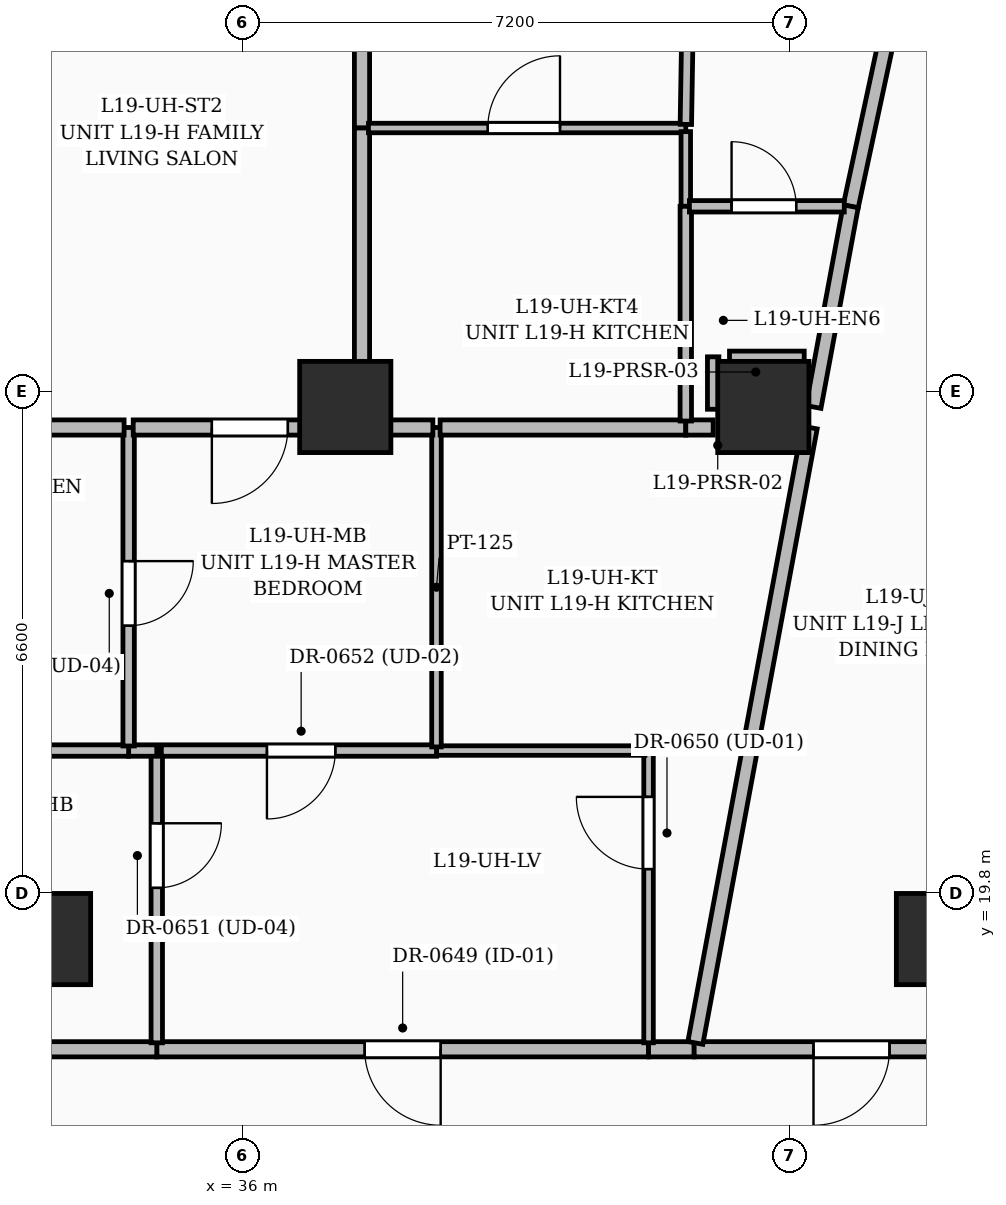
"""IFC4 building model, lengths in metres.
Left out: names, types, materials, properties, quantities, classifications, styles, units other than length and angle.
Written with IfcOpenShell. Run it as: python <this file> out.ifc"""

import sys

from ifc_helpers import new_model, si_unit, direction, frame, frame_2d, origin, origin_2d, place, context, subcontext, project, spatial, rectangle, extrude, element, fill, save


model = new_model("IFC4")
c1 = context("Model", 3, precision=1e-05, world=origin(), true_north=direction((0.0, 1.0)))
c2 = subcontext(c1, "Body", "Model", "MODEL_VIEW")
j1 = project(units=[si_unit("LENGTHUNIT", "METRE"), si_unit("PLANEANGLEUNIT", "RADIAN")], contexts=[c1])
p1 = place(None, origin())
s1 = spatial("IfcSite", under=j1, at=p1, CompositionType="ELEMENT")
p2 = place(p1, origin())
s2 = spatial("IfcBuilding", under=s1, at=p2, CompositionType="ELEMENT")
p3 = place(p2, frame((0.0, 0.0, 78.6)))
s3 = spatial("IfcBuildingStorey", under=s2, at=p3, CompositionType="ELEMENT", Elevation=78.6)
for number, where, z_axis, x_axis in (
    (1, (45.2, 19.2, 0.0), (0.0, 0.0, 1.0), (1.0, 0.0, 0.0)),
    (2, (42.85, 26.2, 0.0), (0.0, 0.0, 1.0), (1.0, 0.0, 0.0)),
    (3, (37.35, 26.2, 0.0), (0.0, 0.0, 1.0), (1.0, 0.0, 0.0)),
    (4, (33.4, 19.2, 0.0), (0.0, 0.0, 1.0), (1.0, 0.0, 0.0)),
):
    element("IfcColumn", number, at=place(p3, frame(where, z_axis=z_axis, x_axis=x_axis)), inside=s3, PredefinedType="COLUMN", context=c2, shape_type="SweptSolid", body=[
        extrude(rectangle(XDim=1.2, YDim=1.2, at=origin_2d()), origin(), (0.0, 0.0, 1.0), 3.6),
    ])
p4 = place(p3, frame((45.111, 34.154, 0.0), z_axis=(0.0, 0.0, 1.0), x_axis=(0.523710369238, -0.851896384047, 0.0)))
e5 = element("IfcWall", 5, at=p4, inside=s3, PredefinedType="SOLIDWALL", context=c2, shape_type="SweptSolid", body=[
    extrude(rectangle(XDim=5.596, YDim=0.3, at=frame_2d((2.798, 0.0))), origin(), (0.0, 0.0, 1.0), 3.35),
])
p5 = place(p4, frame((1.85, 0.0, 0.55)))
e6 = element("IfcOpeningElement", 6, at=p5, cuts=e5, PredefinedType="OPENING", context=c2, shape_type="SweptSolid", body=[
    extrude(rectangle(XDim=2.1, YDim=2.4, at=frame_2d((1.05, 1.2))), frame((0.0, 0.16, 0.0), z_axis=(0.0, -1.0, 0.0), x_axis=(1.0, 0.0, 0.0)), (0.0, 0.0, 1.0), 0.32),
])
p6 = place(p3, frame((41.34, 17.75, 0.0), z_axis=(0.0, 0.0, 1.0), x_axis=(-1.0, 0.0, 0.0)))
e7 = element("IfcWall", 7, at=p6, inside=s3, PredefinedType="PARTITIONING", context=c2, shape_type="SweptSolid", body=[
    extrude(rectangle(XDim=6.47, YDim=0.2, at=frame_2d((3.235, 0.0))), origin(), (0.0, 0.0, 1.0), 3.35),
])
p7 = place(p6, frame((2.735, 0.0, 0.0)))
e8 = element("IfcOpeningElement", 8, at=p7, cuts=e7, PredefinedType="OPENING", context=c2, shape_type="SweptSolid", body=[
    extrude(rectangle(XDim=1.0, YDim=2.2, at=frame_2d((0.5, 1.1))), frame((0.0, 0.11, 0.0), z_axis=(0.0, -1.0, 0.0), x_axis=(1.0, 0.0, 0.0)), (0.0, 0.0, 1.0), 0.22),
])
p8 = place(p3, frame((34.87, 17.75, 0.0), z_axis=(0.0, 0.0, 1.0), x_axis=(-1.0, 0.0, 0.0)))
e9 = element("IfcWall", 9, at=p8, inside=s3, PredefinedType="PARTITIONING", context=c2, shape_type="SweptSolid", body=[
    extrude(rectangle(XDim=2.57, YDim=0.2, at=frame_2d((1.285, 0.0))), origin(), (0.0, 0.0, 1.0), 2.309),
])
p9 = place(p3, frame((41.94, 17.75, 0.0), z_axis=(0.0, 0.0, 1.0), x_axis=(-1.0, 0.0, 0.0)))
e10 = element("IfcWall", 10, at=p9, inside=s3, PredefinedType="PARTITIONING", context=c2, shape_type="SweptSolid", body=[
    extrude(rectangle(XDim=0.6, YDim=0.2, at=frame_2d((0.3, 0.0))), origin(), (0.0, 0.0, 1.0), 3.35),
])
p10 = place(p3, frame((47.51, 17.75, 0.0), z_axis=(0.0, 0.0, 1.0), x_axis=(-1.0, 0.0, 0.0)))
e11 = element("IfcWall", 11, at=p10, inside=s3, PredefinedType="PARTITIONING", context=c2, shape_type="SweptSolid", body=[
    extrude(rectangle(XDim=5.57, YDim=0.2, at=frame_2d((2.785, 0.0))), origin(), (0.0, 0.0, 1.0), 2.309),
])
p11 = place(p10, frame((3.0, 0.0, 0.0)))
e12 = element("IfcOpeningElement", 12, at=p11, cuts=e11, PredefinedType="OPENING", context=c2, shape_type="SweptSolid", body=[
    extrude(rectangle(XDim=1.0, YDim=2.2, at=frame_2d((0.5, 1.1))), frame((0.0, 0.11, 0.0), z_axis=(0.0, -1.0, 0.0), x_axis=(1.0, 0.0, 0.0)), (0.0, 0.0, 1.0), 0.22),
])
p12 = place(p3, frame((34.87, 21.68, 0.0), z_axis=(0.0, 0.0, 1.0), x_axis=(0.0, -1.0, 0.0)))
e13 = element("IfcWall", 13, at=p12, inside=s3, PredefinedType="PARTITIONING", context=c2, shape_type="SweptSolid", body=[
    extrude(rectangle(XDim=3.845, YDim=0.15, at=frame_2d((1.922, 0.0))), origin(), (0.0, 0.0, 1.0), 2.309),
])
p13 = place(p12, frame((0.957, 0.0, 0.0)))
e14 = element("IfcOpeningElement", 14, at=p13, cuts=e13, PredefinedType="OPENING", context=c2, shape_type="SweptSolid", body=[
    extrude(rectangle(XDim=0.85, YDim=2.1, at=frame_2d((0.425, 1.05))), frame((0.0, 0.085, 0.0), z_axis=(0.0, -1.0, 0.0), x_axis=(1.0, 0.0, 0.0)), (0.0, 0.0, 1.0), 0.17),
])
p14 = place(p3, frame((41.34, 17.835, 0.0), z_axis=(0.0, 0.0, 1.0), x_axis=(0.0, 1.0, 0.0)))
e15 = element("IfcWall", 15, at=p14, inside=s3, PredefinedType="PARTITIONING", context=c2, shape_type="SweptSolid", body=[
    extrude(rectangle(XDim=3.845, YDim=0.125, at=frame_2d((1.922, 0.0))), origin(), (0.0, 0.0, 1.0), 3.35),
])
p15 = place(p14, frame((2.285, 0.0, 0.0)))
e16 = element("IfcOpeningElement", 16, at=p15, cuts=e15, PredefinedType="OPENING", context=c2, shape_type="SweptSolid", body=[
    extrude(rectangle(XDim=0.95, YDim=2.2, at=frame_2d((0.475, 1.1))), frame((0.0, 0.072, 0.0), z_axis=(0.0, -1.0, 0.0), x_axis=(1.0, 0.0, 0.0)), (0.0, 0.0, 1.0), 0.145),
])
p16 = place(p3, frame((41.292, 21.68, 0.0), z_axis=(0.0, 0.0, 1.0), x_axis=(-1.0, 0.0, 0.0)))
e17 = element("IfcWall", 17, at=p16, inside=s3, PredefinedType="PARTITIONING", context=c2, shape_type="SweptSolid", body=[
    extrude(rectangle(XDim=2.742, YDim=0.125, at=frame_2d((1.371, 0.0))), origin(), (0.0, 0.0, 1.0), 3.35),
])
p17 = place(p3, frame((38.55, 21.68, 0.0), z_axis=(0.0, 0.0, 1.0), x_axis=(-1.0, 0.0, 0.0)))
e18 = element("IfcWall", 18, at=p17, inside=s3, PredefinedType="PARTITIONING", context=c2, shape_type="SweptSolid", body=[
    extrude(rectangle(XDim=3.62, YDim=0.15, at=frame_2d((1.81, 0.0))), origin(), (0.0, 0.0, 1.0), 2.309),
])
p18 = place(p17, frame((1.331, 0.0, 0.0)))
e19 = element("IfcOpeningElement", 19, at=p18, cuts=e18, PredefinedType="OPENING", context=c2, shape_type="SweptSolid", body=[
    extrude(rectangle(XDim=0.9, YDim=2.15, at=frame_2d((0.45, 1.075))), frame((0.0, 0.085, 0.0), z_axis=(0.0, -1.0, 0.0), x_axis=(1.0, 0.0, 0.0)), (0.0, 0.0, 1.0), 0.17),
])
p19 = place(p3, frame((34.87, 21.68, 0.0), z_axis=(0.0, 0.0, 1.0), x_axis=(-1.0, 0.0, 0.0)))
e20 = element("IfcWall", 20, at=p19, inside=s3, PredefinedType="PARTITIONING", context=c2, shape_type="SweptSolid", body=[
    extrude(rectangle(XDim=0.37, YDim=0.15, at=frame_2d((0.185, 0.0))), origin(), (0.0, 0.0, 1.0), 2.309),
])
p20 = place(p3, frame((34.5, 21.68, 0.0), z_axis=(0.0, 0.0, 1.0), x_axis=(-1.0, 0.0, 0.0)))
e21 = element("IfcWall", 21, at=p20, inside=s3, PredefinedType="PARTITIONING", context=c2, shape_type="SweptSolid", body=[
    extrude(rectangle(XDim=2.115, YDim=0.15, at=frame_2d((1.058, 0.0))), origin(), (0.0, 0.0, 1.0), 3.35),
])
p21 = place(p3, frame((38.55, 25.93, 0.0), z_axis=(0.0, 0.0, 1.0), x_axis=(0.0, -1.0, 0.0)))
e22 = element("IfcWall", 22, at=p21, inside=s3, PredefinedType="PARTITIONING", context=c2, shape_type="SweptSolid", body=[
    extrude(rectangle(XDim=4.202, YDim=0.125, at=frame_2d((2.101, 0.0))), origin(), (0.0, 0.0, 1.0), 3.35),
])
p22 = place(p3, frame((41.956, 17.833, 0.0), z_axis=(0.0, 0.0, 1.0), x_axis=(0.182682671213, 0.98317192883, 0.0)))
e23 = element("IfcWall", 23, at=p22, inside=s3, PredefinedType="PARTITIONING", context=c2, shape_type="SweptSolid", body=[
    extrude(rectangle(XDim=8.235, YDim=0.2, at=frame_2d((4.118, 0.0))), origin(), (0.0, 0.0, 1.0), 2.309),
])
p23 = place(p3, frame((41.83, 25.93, 0.0), z_axis=(0.0, 0.0, 1.0), x_axis=(-1.0, 0.0, 0.0)))
e24 = element("IfcWall", 24, at=p23, inside=s3, PredefinedType="PARTITIONING", context=c2, shape_type="SweptSolid", body=[
    extrude(rectangle(XDim=3.233, YDim=0.2, at=frame_2d((1.616, 0.0))), origin(), (0.0, 0.0, 1.0), 2.309),
])
p24 = place(p3, frame((42.19, 25.93, 0.0), z_axis=(0.0, 0.0, 1.0), x_axis=(-1.0, 0.0, 0.0)))
e25 = element("IfcWall", 25, at=p24, inside=s3, PredefinedType="PARTITIONING", context=c2, shape_type="SweptSolid", body=[
    extrude(rectangle(XDim=0.36, YDim=0.2, at=frame_2d((0.18, 0.0))), origin(), (0.0, 0.0, 1.0), 2.309),
])
p25 = place(p3, frame((34.5, 25.93, 0.0), z_axis=(0.0, 0.0, 1.0), x_axis=(0.0, -1.0, 0.0)))
e26 = element("IfcWall", 26, at=p25, inside=s3, PredefinedType="PARTITIONING", context=c2, shape_type="SweptSolid", body=[
    extrude(rectangle(XDim=4.19, YDim=0.15, at=frame_2d((2.095, 0.0))), origin(), (0.0, 0.0, 1.0), 3.35),
])
p26 = place(p25, frame((1.758, 0.0, 0.0)))
e27 = element("IfcOpeningElement", 27, at=p26, cuts=e26, PredefinedType="OPENING", context=c2, shape_type="SweptSolid", body=[
    extrude(rectangle(XDim=0.85, YDim=2.1, at=frame_2d((0.425, 1.05))), frame((0.0, 0.085, 0.0), z_axis=(0.0, -1.0, 0.0), x_axis=(1.0, 0.0, 0.0)), (0.0, 0.0, 1.0), 0.17),
])
p27 = place(p3, frame((37.57, 25.93, 0.0), z_axis=(0.0, 0.0, 1.0), x_axis=(-1.0, 0.0, 0.0)))
e28 = element("IfcWall", 28, at=p27, inside=s3, PredefinedType="PARTITIONING", context=c2, shape_type="SweptSolid", body=[
    extrude(rectangle(XDim=3.01, YDim=0.2, at=frame_2d((1.505, 0.0))), origin(), (0.0, 0.0, 1.0), 3.35),
])
p28 = place(p27, frame((0.975, 0.0, 0.0)))
e29 = element("IfcOpeningElement", 29, at=p28, cuts=e28, PredefinedType="OPENING", context=c2, shape_type="SweptSolid", body=[
    extrude(rectangle(XDim=1.0, YDim=2.2, at=frame_2d((0.5, 1.1))), frame((0.0, 0.11, 0.0), z_axis=(0.0, -1.0, 0.0), x_axis=(1.0, 0.0, 0.0)), (0.0, 0.0, 1.0), 0.22),
])
p29 = place(p3, frame((38.502, 25.93, 0.0), z_axis=(0.0, 0.0, 1.0), x_axis=(-1.0, 0.0, 0.0)))
e30 = element("IfcWall", 30, at=p29, inside=s3, PredefinedType="PARTITIONING", context=c2, shape_type="SweptSolid", body=[
    extrude(rectangle(XDim=0.932, YDim=0.2, at=frame_2d((0.466, 0.0))), origin(), (0.0, 0.0, 1.0), 2.309),
])
p30 = place(p3, frame((34.44, 25.93, 0.0), z_axis=(0.0, 0.0, 1.0), x_axis=(-1.0, 0.0, 0.0)))
e31 = element("IfcWall", 31, at=p30, inside=s3, PredefinedType="PARTITIONING", context=c2, shape_type="SweptSolid", body=[
    extrude(rectangle(XDim=2.055, YDim=0.2, at=frame_2d((1.027, 0.0))), origin(), (0.0, 0.0, 1.0), 3.01),
])
p31 = place(p3, frame((45.093, 33.932, 0.0), z_axis=(0.0, 0.0, 1.0), x_axis=(-0.209881245986, -0.977726885476, 0.0)))
e32 = element("IfcWall", 32, at=p31, inside=s3, PredefinedType="PARTITIONING", context=c2, shape_type="SweptSolid", body=[
    extrude(rectangle(XDim=5.208, YDim=0.2, at=frame_2d((2.604, 0.0))), origin(), (0.0, 0.0, 1.0), 2.37),
])
p32 = place(p3, frame((44.0, 28.84, 0.0), z_axis=(0.0, 0.0, 1.0), x_axis=(-0.18247668152, -0.983210181345, 0.0)))
e33 = element("IfcWall", 33, at=p32, inside=s3, PredefinedType="PARTITIONING", context=c2, shape_type="SweptSolid", body=[
    extrude(rectangle(XDim=2.685, YDim=0.2, at=frame_2d((1.343, 0.0))), origin(), (0.0, 0.0, 1.0), 3.01),
])
p33 = place(p3, frame((37.57, 29.87, 0.0), z_axis=(0.0, 0.0, 1.0), x_axis=(0.0, 1.0, 0.0)))
e34 = element("IfcWall", 34, at=p33, inside=s3, PredefinedType="PARTITIONING", context=c2, shape_type="SweptSolid", body=[
    extrude(rectangle(XDim=6.99, YDim=0.2, at=frame_2d((3.495, 0.0))), origin(), (0.0, 0.0, 1.0), 2.37),
])
p34 = place(p33, frame((2.966, 0.0, 0.0)))
e35 = element("IfcOpeningElement", 35, at=p34, cuts=e34, PredefinedType="OPENING", context=c2, shape_type="SweptSolid", body=[
    extrude(rectangle(XDim=1.0, YDim=2.2, at=frame_2d((0.5, 1.1))), frame((0.0, 0.11, 0.0), z_axis=(0.0, -1.0, 0.0), x_axis=(1.0, 0.0, 0.0)), (0.0, 0.0, 1.0), 0.22),
])
p35 = place(p3, frame((37.57, 26.015, 0.0), z_axis=(0.0, 0.0, 1.0), x_axis=(0.0, 1.0, 0.0)))
e36 = element("IfcWall", 36, at=p35, inside=s3, PredefinedType="PARTITIONING", context=c2, shape_type="SweptSolid", body=[
    extrude(rectangle(XDim=3.855, YDim=0.2, at=frame_2d((1.928, 0.0))), origin(), (0.0, 0.0, 1.0), 3.01),
])
p36 = place(p3, frame((37.655, 29.87, 0.0), z_axis=(0.0, 0.0, 1.0), x_axis=(1.0, 0.0, 0.0)))
e37 = element("IfcWall", 37, at=p36, inside=s3, PredefinedType="PARTITIONING", context=c2, shape_type="SweptSolid", body=[
    extrude(rectangle(XDim=4.175, YDim=0.125, at=frame_2d((2.087, 0.0))), origin(), (0.0, 0.0, 1.0), 3.35),
])
p37 = place(p36, frame((1.57, 0.0, 0.0)))
e38 = element("IfcOpeningElement", 38, at=p37, cuts=e37, PredefinedType="OPENING", context=c2, shape_type="SweptSolid", body=[
    extrude(rectangle(XDim=0.95, YDim=2.2, at=frame_2d((0.475, 1.1))), frame((0.0, 0.072, 0.0), z_axis=(0.0, -1.0, 0.0), x_axis=(1.0, 0.0, 0.0)), (0.0, 0.0, 1.0), 0.145),
])
p38 = place(p3, frame((41.831, 29.917, 0.0), z_axis=(0.0, 0.0, 1.0), x_axis=(0.016599696118, 0.999862215552, 0.0)))
e39 = element("IfcWall", 39, at=p38, inside=s3, PredefinedType="PARTITIONING", context=c2, shape_type="SweptSolid", body=[
    extrude(rectangle(XDim=9.06, YDim=0.15, at=frame_2d((4.53, 0.0))), origin(), (0.0, 0.0, 1.0), 2.345),
])
p39 = place(p38, frame((4.152, 0.0, 0.0)))
e40 = element("IfcOpeningElement", 40, at=p39, cuts=e39, PredefinedType="OPENING", context=c2, shape_type="SweptSolid", body=[
    extrude(rectangle(XDim=0.9, YDim=2.15, at=frame_2d((0.45, 1.075))), frame((0.0, 0.085, 0.0), z_axis=(0.0, -1.0, 0.0), x_axis=(1.0, 0.0, 0.0)), (0.0, 0.0, 1.0), 0.17),
])
p40 = place(p3, frame((41.83, 28.84, 0.0), z_axis=(0.0, 0.0, 1.0), x_axis=(0.0, 1.0, 0.0)))
e41 = element("IfcWall", 41, at=p40, inside=s3, PredefinedType="PARTITIONING", context=c2, shape_type="SweptSolid", body=[
    extrude(rectangle(XDim=0.982, YDim=0.125, at=frame_2d((0.491, 0.0))), origin(), (0.0, 0.0, 1.0), 3.01),
])
p41 = place(p3, frame((41.83, 26.015, 0.0), z_axis=(0.0, 0.0, 1.0), x_axis=(0.0, 1.0, 0.0)))
e42 = element("IfcWall", 42, at=p41, inside=s3, PredefinedType="PARTITIONING", context=c2, shape_type="SweptSolid", body=[
    extrude(rectangle(XDim=2.825, YDim=0.15, at=frame_2d((1.413, 0.0))), origin(), (0.0, 0.0, 1.0), 2.309),
])
p42 = place(p3, frame((41.877, 28.84, 0.0), z_axis=(0.0, 0.0, 1.0), x_axis=(1.0, 0.0, 0.0)))
e43 = element("IfcWall", 43, at=p42, inside=s3, PredefinedType="PARTITIONING", context=c2, shape_type="SweptSolid", body=[
    extrude(rectangle(XDim=2.038, YDim=0.15, at=frame_2d((1.019, 0.0))), origin(), (0.0, 0.0, 1.0), 2.345),
])
p43 = place(p42, frame((0.555, 0.0, 0.0)))
e44 = element("IfcOpeningElement", 44, at=p43, cuts=e43, PredefinedType="OPENING", context=c2, shape_type="SweptSolid", body=[
    extrude(rectangle(XDim=0.85, YDim=2.1, at=frame_2d((0.425, 1.05))), frame((0.0, 0.085, 0.0), z_axis=(0.0, -1.0, 0.0), x_axis=(1.0, 0.0, 0.0)), (0.0, 0.0, 1.0), 0.17),
])
p44 = place(p3, frame((42.19, 26.17, 0.0), z_axis=(0.0, 0.0, 1.0), x_axis=(0.0, 1.0, 0.0)))
e45 = element("IfcWall", 45, at=p44, inside=s3, PredefinedType="PARTITIONING", context=c2, shape_type="SweptSolid", body=[
    extrude(rectangle(XDim=0.69, YDim=0.15, at=frame_2d((0.345, 0.0))), origin(), (0.0, 0.0, 1.0), 2.309),
])
p45 = place(p3, frame((42.405, 26.86, 0.0), z_axis=(0.0, 0.0, 1.0), x_axis=(1.0, 0.0, 0.0)))
e46 = element("IfcWall", 46, at=p45, inside=s3, PredefinedType="PARTITIONING", context=c2, shape_type="SweptSolid", body=[
    extrude(rectangle(XDim=0.983, YDim=0.15, at=frame_2d((0.491, 0.0))), origin(), (0.0, 0.0, 1.0), 2.345),
])
p46 = place(p7, origin())
e47 = element("IfcDoor", 47, at=p46, inside=s3, OperationType="SINGLE_SWING_LEFT", PredefinedType="DOOR", context=c2, shape_type="SweptSolid", body=[
    extrude(rectangle(XDim=1.0, YDim=2.2, at=frame_2d((0.5, 1.1))), frame((0.0, 0.025, 0.0), z_axis=(0.0, -1.0, 0.0), x_axis=(1.0, 0.0, 0.0)), (0.0, 0.0, 1.0), 0.05),
])
fill(e8, e47)
p47 = place(p15, origin())
e48 = element("IfcDoor", 48, at=p47, inside=s3, OperationType="SINGLE_SWING_RIGHT", PredefinedType="DOOR", context=c2, shape_type="SweptSolid", body=[
    extrude(rectangle(XDim=0.95, YDim=2.2, at=frame_2d((0.475, 1.1))), frame((0.0, 0.025, 0.0), z_axis=(0.0, -1.0, 0.0), x_axis=(1.0, 0.0, 0.0)), (0.0, 0.0, 1.0), 0.05),
])
fill(e16, e48)
p48 = place(p13, origin())
e49 = element("IfcDoor", 49, at=p48, inside=s3, OperationType="SINGLE_SWING_LEFT", PredefinedType="DOOR", context=c2, shape_type="SweptSolid", body=[
    extrude(rectangle(XDim=0.85, YDim=2.1, at=frame_2d((0.425, 1.05))), frame((0.0, 0.025, 0.0), z_axis=(0.0, -1.0, 0.0), x_axis=(1.0, 0.0, 0.0)), (0.0, 0.0, 1.0), 0.05),
])
fill(e14, e49)
p49 = place(p18, origin())
e50 = element("IfcDoor", 50, at=p49, inside=s3, OperationType="SINGLE_SWING_RIGHT", PredefinedType="DOOR", context=c2, shape_type="SweptSolid", body=[
    extrude(rectangle(XDim=0.9, YDim=2.15, at=frame_2d((0.45, 1.075))), frame((0.0, 0.025, 0.0), z_axis=(0.0, -1.0, 0.0), x_axis=(1.0, 0.0, 0.0)), (0.0, 0.0, 1.0), 0.05),
])
fill(e19, e50)
p50 = place(p26, origin())
e51 = element("IfcDoor", 51, at=p50, inside=s3, OperationType="SINGLE_SWING_LEFT", PredefinedType="DOOR", context=c2, shape_type="SweptSolid", body=[
    extrude(rectangle(XDim=0.85, YDim=2.1, at=frame_2d((0.425, 1.05))), frame((0.0, 0.025, 0.0), z_axis=(0.0, -1.0, 0.0), x_axis=(1.0, 0.0, 0.0)), (0.0, 0.0, 1.0), 0.05),
])
fill(e27, e51)
p51 = place(p11, origin())
e52 = element("IfcDoor", 52, at=p51, inside=s3, OperationType="SINGLE_SWING_RIGHT", PredefinedType="DOOR", context=c2, shape_type="SweptSolid", body=[
    extrude(rectangle(XDim=1.0, YDim=2.2, at=frame_2d((0.5, 1.1))), frame((0.0, 0.025, 0.0), z_axis=(0.0, -1.0, 0.0), x_axis=(1.0, 0.0, 0.0)), (0.0, 0.0, 1.0), 0.05),
])
fill(e12, e52)
p52 = place(p37, origin())
e53 = element("IfcDoor", 53, at=p52, inside=s3, OperationType="SINGLE_SWING_RIGHT", PredefinedType="DOOR", context=c2, shape_type="SweptSolid", body=[
    extrude(rectangle(XDim=0.95, YDim=2.2, at=frame_2d((0.475, 1.1))), frame((0.0, 0.025, 0.0), z_axis=(0.0, -1.0, 0.0), x_axis=(1.0, 0.0, 0.0)), (0.0, 0.0, 1.0), 0.05),
])
fill(e38, e53)
p53 = place(p43, origin())
e54 = element("IfcDoor", 54, at=p53, inside=s3, OperationType="SINGLE_SWING_LEFT", PredefinedType="DOOR", context=c2, shape_type="SweptSolid", body=[
    extrude(rectangle(XDim=0.85, YDim=2.1, at=frame_2d((0.425, 1.05))), frame((0.0, 0.025, 0.0), z_axis=(0.0, -1.0, 0.0), x_axis=(1.0, 0.0, 0.0)), (0.0, 0.0, 1.0), 0.05),
])
fill(e44, e54)
p54 = place(p28, origin())
e55 = element("IfcDoor", 55, at=p54, inside=s3, OperationType="SINGLE_SWING_RIGHT", PredefinedType="DOOR", context=c2, shape_type="SweptSolid", body=[
    extrude(rectangle(XDim=1.0, YDim=2.2, at=frame_2d((0.5, 1.1))), frame((0.0, 0.025, 0.0), z_axis=(0.0, -1.0, 0.0), x_axis=(1.0, 0.0, 0.0)), (0.0, 0.0, 1.0), 0.05),
])
fill(e29, e55)
save(model, sys.argv[1])
